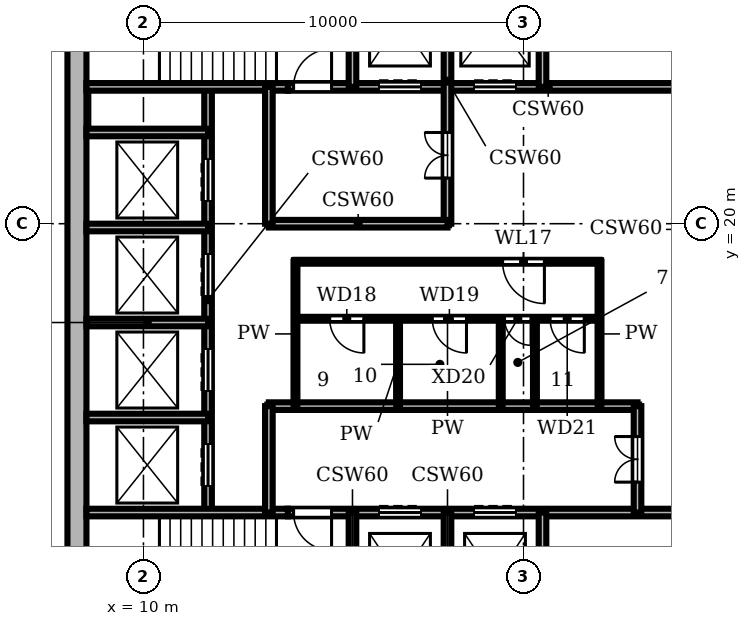
"""IFC4 building model, lengths in metres.
Left out: names, types, materials, properties, quantities, classifications, styles, units other than length and angle.
Written with IfcOpenShell. Run it as: python <this file> out.ifc"""

import sys

from ifc_helpers import new_model, si_unit, direction, frame, frame_2d, origin, place, context, subcontext, project, spatial, rectangle, extrude, element, fill, save


model = new_model("IFC4")
c1 = context("Model", 3, precision=1e-05, world=origin(), true_north=direction((0.0, 1.0)))
c2 = subcontext(c1, "Body", "Model", "MODEL_VIEW")
j1 = project(units=[si_unit("LENGTHUNIT", "METRE"), si_unit("PLANEANGLEUNIT", "RADIAN")], contexts=[c1])
p1 = place(None, origin())
s1 = spatial("IfcSite", under=j1, at=p1, CompositionType="ELEMENT")
p2 = place(p1, origin())
s2 = spatial("IfcBuilding", under=s1, at=p2, CompositionType="ELEMENT")
p3 = place(p2, frame((0.0, 0.0, 306.0)))
s3 = spatial("IfcBuildingStorey", under=s2, at=p3, CompositionType="ELEMENT", Elevation=306.0)
p4 = place(p3, frame((8.25, 27.5, 0.0), z_axis=(0.0, 0.0, 1.0), x_axis=(0.0, -1.0, 0.0)))
e1 = element("IfcWall", 1, at=p4, inside=s3, PredefinedType="SHEAR", context=c2, shape_type="SweptSolid", body=[
    extrude(rectangle(XDim=19.0, YDim=0.5, at=frame_2d((9.5, 0.0))), origin(), (0.0, 0.0, 1.0), 3.9),
])
p5 = place(p3, frame((8.5, 12.4, 0.0), z_axis=(0.0, 0.0, 1.0), x_axis=(1.0, 0.0, 0.0)))
e2 = element("IfcWall", 2, at=p5, inside=s3, PredefinedType="SHEAR", context=c2, shape_type="SweptSolid", body=[
    extrude(rectangle(XDim=5.3, YDim=0.2, at=frame_2d((2.65, 0.0))), origin(), (0.0, 0.0, 1.0), 3.58),
])
p6 = place(p3, frame((13.8, 12.4, 0.0), z_axis=(0.0, 0.0, 1.0), x_axis=(1.0, 0.0, 0.0)))
e3 = element("IfcWall", 3, at=p6, inside=s3, PredefinedType="SHEAR", context=c2, shape_type="SweptSolid", body=[
    extrude(rectangle(XDim=13.7, YDim=0.2, at=frame_2d((6.85, 0.0))), origin(), (0.0, 0.0, 1.0), 3.58),
])
p7 = place(p6, frame((2.4, 0.0, 0.0)))
e4 = element("IfcOpeningElement", 4, at=p7, cuts=e3, PredefinedType="OPENING", context=c2, shape_type="SweptSolid", body=[
    extrude(rectangle(XDim=1.1, YDim=2.1, at=frame_2d((0.55, 1.05))), frame((0.0, 0.11, 0.0), z_axis=(0.0, -1.0, 0.0), x_axis=(1.0, 0.0, 0.0)), (0.0, 0.0, 1.0), 0.22),
])
p8 = place(p6, frame((4.9, 0.0, 0.0)))
e5 = element("IfcOpeningElement", 5, at=p8, cuts=e3, PredefinedType="OPENING", context=c2, shape_type="SweptSolid", body=[
    extrude(rectangle(XDim=1.1, YDim=2.1, at=frame_2d((0.55, 1.05))), frame((0.0, 0.11, 0.0), z_axis=(0.0, -1.0, 0.0), x_axis=(1.0, 0.0, 0.0)), (0.0, 0.0, 1.0), 0.22),
])
p9 = place(p6, frame((0.15, 0.0, 0.0)))
e6 = element("IfcOpeningElement", 6, at=p9, cuts=e3, PredefinedType="OPENING", context=c2, shape_type="SweptSolid", body=[
    extrude(rectangle(XDim=1.0, YDim=2.1, at=frame_2d((0.5, 1.05))), frame((0.0, 0.11, 0.0), z_axis=(0.0, -1.0, 0.0), x_axis=(1.0, 0.0, 0.0)), (0.0, 0.0, 1.0), 0.22),
])
p10 = place(p3, frame((8.5, 14.9, 0.0), z_axis=(0.0, 0.0, 1.0), x_axis=(1.0, 0.0, 0.0)))
e7 = element("IfcWall", 7, at=p10, inside=s3, PredefinedType="SHEAR", context=c2, shape_type="SweptSolid", body=[
    extrude(rectangle(XDim=3.2, YDim=0.2, at=frame_2d((1.6, 0.0))), origin(), (0.0, 0.0, 1.0), 3.58),
])
p11 = place(p3, frame((13.3, 15.2, 0.0), z_axis=(0.0, 0.0, 1.0), x_axis=(1.0, 0.0, 0.0)))
e8 = element("IfcWall", 8, at=p11, inside=s3, PredefinedType="SHEAR", context=c2, shape_type="SweptSolid", body=[
    extrude(rectangle(XDim=9.7, YDim=0.2, at=frame_2d((4.85, 0.0))), origin(), (0.0, 0.0, 1.0), 3.58),
])
p12 = place(p3, frame((8.5, 17.4, 0.0), z_axis=(0.0, 0.0, 1.0), x_axis=(1.0, 0.0, 0.0)))
e9 = element("IfcWall", 9, at=p12, inside=s3, PredefinedType="SHEAR", context=c2, shape_type="SweptSolid", body=[
    extrude(rectangle(XDim=3.2, YDim=0.2, at=frame_2d((1.6, 0.0))), origin(), (0.0, 0.0, 1.0), 3.58),
])
p13 = place(p3, frame((14.0, 17.5, 0.0), z_axis=(0.0, 0.0, 1.0), x_axis=(1.0, 0.0, 0.0)))
e10 = element("IfcWall", 10, at=p13, inside=s3, PredefinedType="PARTITIONING", context=c2, shape_type="SweptSolid", body=[
    extrude(rectangle(XDim=8.0, YDim=0.1, at=frame_2d((4.0, 0.0))), origin(), (0.0, 0.0, 1.0), 3.58),
])
p14 = place(p13, frame((0.9, 0.0, 0.0)))
e11 = element("IfcOpeningElement", 11, at=p14, cuts=e10, PredefinedType="OPENING", context=c2, shape_type="SweptSolid", body=[
    extrude(rectangle(XDim=0.9, YDim=2.1, at=frame_2d((0.45, 1.05))), frame((0.0, 0.06, 0.0), z_axis=(0.0, -1.0, 0.0), x_axis=(1.0, 0.0, 0.0)), (0.0, 0.0, 1.0), 0.12),
])
p15 = place(p13, frame((3.6, 0.0, 0.0)))
e12 = element("IfcOpeningElement", 12, at=p15, cuts=e10, PredefinedType="OPENING", context=c2, shape_type="SweptSolid", body=[
    extrude(rectangle(XDim=0.9, YDim=2.1, at=frame_2d((0.45, 1.05))), frame((0.0, 0.06, 0.0), z_axis=(0.0, -1.0, 0.0), x_axis=(1.0, 0.0, 0.0)), (0.0, 0.0, 1.0), 0.12),
])
p16 = place(p13, frame((5.5, 0.0, 0.0)))
e13 = element("IfcOpeningElement", 13, at=p16, cuts=e10, PredefinedType="OPENING", context=c2, shape_type="SweptSolid", body=[
    extrude(rectangle(XDim=0.7, YDim=2.1, at=frame_2d((0.35, 1.05))), frame((0.0, 0.06, 0.0), z_axis=(0.0, -1.0, 0.0), x_axis=(1.0, 0.0, 0.0)), (0.0, 0.0, 1.0), 0.12),
])
p17 = place(p13, frame((6.7, 0.0, 0.0)))
e14 = element("IfcOpeningElement", 14, at=p17, cuts=e10, PredefinedType="OPENING", context=c2, shape_type="SweptSolid", body=[
    extrude(rectangle(XDim=0.9, YDim=2.1, at=frame_2d((0.45, 1.05))), frame((0.0, 0.06, 0.0), z_axis=(0.0, -1.0, 0.0), x_axis=(1.0, 0.0, 0.0)), (0.0, 0.0, 1.0), 0.12),
])
p18 = place(p3, frame((14.0, 19.0, 0.0), z_axis=(0.0, 0.0, 1.0), x_axis=(1.0, 0.0, 0.0)))
e15 = element("IfcWall", 15, at=p18, inside=s3, PredefinedType="PARTITIONING", context=c2, shape_type="SweptSolid", body=[
    extrude(rectangle(XDim=8.0, YDim=0.1, at=frame_2d((4.0, 0.0))), origin(), (0.0, 0.0, 1.0), 3.58),
])
p19 = place(p18, frame((5.45, 0.0, 0.0)))
e16 = element("IfcOpeningElement", 16, at=p19, cuts=e15, PredefinedType="OPENING", context=c2, shape_type="SweptSolid", body=[
    extrude(rectangle(XDim=1.1, YDim=2.1, at=frame_2d((0.55, 1.05))), frame((0.0, 0.06, 0.0), z_axis=(0.0, -1.0, 0.0), x_axis=(1.0, 0.0, 0.0)), (0.0, 0.0, 1.0), 0.12),
])
p20 = place(p3, frame((8.5, 19.9, 0.0), z_axis=(0.0, 0.0, 1.0), x_axis=(1.0, 0.0, 0.0)))
e17 = element("IfcWall", 17, at=p20, inside=s3, PredefinedType="SHEAR", context=c2, shape_type="SweptSolid", body=[
    extrude(rectangle(XDim=3.2, YDim=0.2, at=frame_2d((1.6, 0.0))), origin(), (0.0, 0.0, 1.0), 3.58),
])
p21 = place(p3, frame((13.3, 20.0, 0.0), z_axis=(0.0, 0.0, 1.0), x_axis=(1.0, 0.0, 0.0)))
e18 = element("IfcWall", 18, at=p21, inside=s3, PredefinedType="SHEAR", context=c2, shape_type="SweptSolid", body=[
    extrude(rectangle(XDim=4.7, YDim=0.2, at=frame_2d((2.35, 0.0))), origin(), (0.0, 0.0, 1.0), 3.58),
])
p22 = place(p3, frame((8.5, 22.4, 0.0), z_axis=(0.0, 0.0, 1.0), x_axis=(1.0, 0.0, 0.0)))
e19 = element("IfcWall", 19, at=p22, inside=s3, PredefinedType="SHEAR", context=c2, shape_type="SweptSolid", body=[
    extrude(rectangle(XDim=3.2, YDim=0.2, at=frame_2d((1.6, 0.0))), origin(), (0.0, 0.0, 1.0), 3.58),
])
p23 = place(p3, frame((8.5, 23.6, 0.0), z_axis=(0.0, 0.0, 1.0), x_axis=(1.0, 0.0, 0.0)))
e20 = element("IfcWall", 20, at=p23, inside=s3, PredefinedType="SHEAR", context=c2, shape_type="SweptSolid", body=[
    extrude(rectangle(XDim=5.3, YDim=0.2, at=frame_2d((2.65, 0.0))), origin(), (0.0, 0.0, 1.0), 3.58),
])
p24 = place(p3, frame((13.8, 23.6, 0.0), z_axis=(0.0, 0.0, 1.0), x_axis=(1.0, 0.0, 0.0)))
e21 = element("IfcWall", 21, at=p24, inside=s3, PredefinedType="SHEAR", context=c2, shape_type="SweptSolid", body=[
    extrude(rectangle(XDim=13.7, YDim=0.2, at=frame_2d((6.85, 0.0))), origin(), (0.0, 0.0, 1.0), 3.58),
])
p25 = place(p24, frame((2.4, 0.0, 0.0)))
e22 = element("IfcOpeningElement", 22, at=p25, cuts=e21, PredefinedType="OPENING", context=c2, shape_type="SweptSolid", body=[
    extrude(rectangle(XDim=1.1, YDim=2.1, at=frame_2d((0.55, 1.05))), frame((0.0, 0.11, 0.0), z_axis=(0.0, -1.0, 0.0), x_axis=(1.0, 0.0, 0.0)), (0.0, 0.0, 1.0), 0.22),
])
p26 = place(p24, frame((4.9, 0.0, 0.0)))
e23 = element("IfcOpeningElement", 23, at=p26, cuts=e21, PredefinedType="OPENING", context=c2, shape_type="SweptSolid", body=[
    extrude(rectangle(XDim=1.1, YDim=2.1, at=frame_2d((0.55, 1.05))), frame((0.0, 0.11, 0.0), z_axis=(0.0, -1.0, 0.0), x_axis=(1.0, 0.0, 0.0)), (0.0, 0.0, 1.0), 0.22),
])
p27 = place(p24, frame((0.15, 0.0, 0.0)))
e24 = element("IfcOpeningElement", 24, at=p27, cuts=e21, PredefinedType="OPENING", context=c2, shape_type="SweptSolid", body=[
    extrude(rectangle(XDim=1.0, YDim=2.1, at=frame_2d((0.5, 1.05))), frame((0.0, 0.11, 0.0), z_axis=(0.0, -1.0, 0.0), x_axis=(1.0, 0.0, 0.0)), (0.0, 0.0, 1.0), 0.22),
])
p28 = place(p3, frame((11.7, 12.4, 0.0), z_axis=(0.0, 0.0, 1.0), x_axis=(0.0, 1.0, 0.0)))
e25 = element("IfcWall", 25, at=p28, inside=s3, PredefinedType="SHEAR", context=c2, shape_type="SweptSolid", body=[
    extrude(rectangle(XDim=11.2, YDim=0.2, at=frame_2d((5.6, 0.0))), origin(), (0.0, 0.0, 1.0), 3.58),
])
p29 = place(p28, frame((0.7, 0.0, 0.0)))
e26 = element("IfcOpeningElement", 26, at=p29, cuts=e25, PredefinedType="OPENING", context=c2, shape_type="SweptSolid", body=[
    extrude(rectangle(XDim=1.1, YDim=2.1, at=frame_2d((0.55, 1.05))), frame((0.0, 0.11, 0.0), z_axis=(0.0, -1.0, 0.0), x_axis=(1.0, 0.0, 0.0)), (0.0, 0.0, 1.0), 0.22),
])
p30 = place(p28, frame((3.2, 0.0, 0.0)))
e27 = element("IfcOpeningElement", 27, at=p30, cuts=e25, PredefinedType="OPENING", context=c2, shape_type="SweptSolid", body=[
    extrude(rectangle(XDim=1.1, YDim=2.1, at=frame_2d((0.55, 1.05))), frame((0.0, 0.11, 0.0), z_axis=(0.0, -1.0, 0.0), x_axis=(1.0, 0.0, 0.0)), (0.0, 0.0, 1.0), 0.22),
])
p31 = place(p28, frame((5.7, 0.0, 0.0)))
e28 = element("IfcOpeningElement", 28, at=p31, cuts=e25, PredefinedType="OPENING", context=c2, shape_type="SweptSolid", body=[
    extrude(rectangle(XDim=1.1, YDim=2.1, at=frame_2d((0.55, 1.05))), frame((0.0, 0.11, 0.0), z_axis=(0.0, -1.0, 0.0), x_axis=(1.0, 0.0, 0.0)), (0.0, 0.0, 1.0), 0.22),
])
p32 = place(p28, frame((8.2, 0.0, 0.0)))
e29 = element("IfcOpeningElement", 29, at=p32, cuts=e25, PredefinedType="OPENING", context=c2, shape_type="SweptSolid", body=[
    extrude(rectangle(XDim=1.1, YDim=2.1, at=frame_2d((0.55, 1.05))), frame((0.0, 0.11, 0.0), z_axis=(0.0, -1.0, 0.0), x_axis=(1.0, 0.0, 0.0)), (0.0, 0.0, 1.0), 0.22),
])
p33 = place(p3, frame((13.3, 12.4, 0.0), z_axis=(0.0, 0.0, 1.0), x_axis=(0.0, 1.0, 0.0)))
e30 = element("IfcWall", 30, at=p33, inside=s3, PredefinedType="SHEAR", context=c2, shape_type="SweptSolid", body=[
    extrude(rectangle(XDim=2.8, YDim=0.2, at=frame_2d((1.4, 0.0))), origin(), (0.0, 0.0, 1.0), 3.58),
])
p34 = place(p3, frame((13.3, 20.0, 0.0), z_axis=(0.0, 0.0, 1.0), x_axis=(0.0, 1.0, 0.0)))
e31 = element("IfcWall", 31, at=p34, inside=s3, PredefinedType="SHEAR", context=c2, shape_type="SweptSolid", body=[
    extrude(rectangle(XDim=3.6, YDim=0.2, at=frame_2d((1.8, 0.0))), origin(), (0.0, 0.0, 1.0), 3.58),
])
p35 = place(p3, frame((14.0, 15.2, 0.0), z_axis=(0.0, 0.0, 1.0), x_axis=(0.0, 1.0, 0.0)))
e32 = element("IfcWall", 32, at=p35, inside=s3, PredefinedType="PARTITIONING", context=c2, shape_type="SweptSolid", body=[
    extrude(rectangle(XDim=3.8, YDim=0.1, at=frame_2d((1.9, 0.0))), origin(), (0.0, 0.0, 1.0), 3.58),
])
for number, where, z_axis, x_axis in (
    (33, (15.5, 8.5, 0.0), (0.0, 0.0, 1.0), (0.0, 1.0, 0.0)),
    (34, (15.5, 23.6, 0.0), (0.0, 0.0, 1.0), (0.0, 1.0, 0.0)),
):
    element("IfcWall", number, at=place(p3, frame(where, z_axis=z_axis, x_axis=x_axis)), inside=s3, PredefinedType="SHEAR", context=c2, shape_type="SweptSolid", body=[
        extrude(rectangle(XDim=3.9, YDim=0.2, at=frame_2d((1.95, 0.0))), origin(), (0.0, 0.0, 1.0), 3.58),
    ])
p36 = place(p3, frame((16.7, 15.2, 0.0), z_axis=(0.0, 0.0, 1.0), x_axis=(0.0, 1.0, 0.0)))
e35 = element("IfcWall", 35, at=p36, inside=s3, PredefinedType="PARTITIONING", context=c2, shape_type="SweptSolid", body=[
    extrude(rectangle(XDim=2.3, YDim=0.1, at=frame_2d((1.15, 0.0))), origin(), (0.0, 0.0, 1.0), 3.58),
])
p37 = place(p3, frame((18.0, 8.5, 0.0), z_axis=(0.0, 0.0, 1.0), x_axis=(0.0, 1.0, 0.0)))
e36 = element("IfcWall", 36, at=p37, inside=s3, PredefinedType="SHEAR", context=c2, shape_type="SweptSolid", body=[
    extrude(rectangle(XDim=3.9, YDim=0.2, at=frame_2d((1.95, 0.0))), origin(), (0.0, 0.0, 1.0), 3.58),
])
p38 = place(p3, frame((18.0, 20.0, 0.0), z_axis=(0.0, 0.0, 1.0), x_axis=(0.0, 1.0, 0.0)))
e37 = element("IfcWall", 37, at=p38, inside=s3, PredefinedType="SHEAR", context=c2, shape_type="SweptSolid", body=[
    extrude(rectangle(XDim=7.5, YDim=0.2, at=frame_2d((3.75, 0.0))), origin(), (0.0, 0.0, 1.0), 3.58),
])
p39 = place(p38, frame((1.2, 0.0, 0.0)))
e38 = element("IfcOpeningElement", 38, at=p39, cuts=e37, PredefinedType="OPENING", context=c2, shape_type="SweptSolid", body=[
    extrude(rectangle(XDim=1.2, YDim=2.1, at=frame_2d((0.6, 1.05))), frame((0.0, 0.11, 0.0), z_axis=(0.0, -1.0, 0.0), x_axis=(1.0, 0.0, 0.0)), (0.0, 0.0, 1.0), 0.22),
])
for number, where, z_axis, x_axis in (
    (39, (19.4, 15.2, 0.0), (0.0, 0.0, 1.0), (0.0, 1.0, 0.0)),
    (40, (20.3, 15.2, 0.0), (0.0, 0.0, 1.0), (0.0, 1.0, 0.0)),
):
    element("IfcWall", number, at=place(p3, frame(where, z_axis=z_axis, x_axis=x_axis)), inside=s3, PredefinedType="PARTITIONING", context=c2, shape_type="SweptSolid", body=[
        extrude(rectangle(XDim=2.3, YDim=0.1, at=frame_2d((1.15, 0.0))), origin(), (0.0, 0.0, 1.0), 3.58),
    ])
for number, where, z_axis, x_axis in (
    (41, (20.5, 8.5, 0.0), (0.0, 0.0, 1.0), (0.0, 1.0, 0.0)),
    (42, (20.5, 23.6, 0.0), (0.0, 0.0, 1.0), (0.0, 1.0, 0.0)),
):
    element("IfcWall", number, at=place(p3, frame(where, z_axis=z_axis, x_axis=x_axis)), inside=s3, PredefinedType="SHEAR", context=c2, shape_type="SweptSolid", body=[
        extrude(rectangle(XDim=3.9, YDim=0.2, at=frame_2d((1.95, 0.0))), origin(), (0.0, 0.0, 1.0), 3.58),
    ])
p40 = place(p3, frame((22.0, 15.2, 0.0), z_axis=(0.0, 0.0, 1.0), x_axis=(0.0, 1.0, 0.0)))
e43 = element("IfcWall", 43, at=p40, inside=s3, PredefinedType="PARTITIONING", context=c2, shape_type="SweptSolid", body=[
    extrude(rectangle(XDim=3.8, YDim=0.1, at=frame_2d((1.9, 0.0))), origin(), (0.0, 0.0, 1.0), 3.58),
])
p41 = place(p3, frame((23.0, 12.4, 0.0), z_axis=(0.0, 0.0, 1.0), x_axis=(0.0, 1.0, 0.0)))
e44 = element("IfcWall", 44, at=p41, inside=s3, PredefinedType="SHEAR", context=c2, shape_type="SweptSolid", body=[
    extrude(rectangle(XDim=2.8, YDim=0.2, at=frame_2d((1.4, 0.0))), origin(), (0.0, 0.0, 1.0), 3.58),
])
p42 = place(p41, frame((0.8, 0.0, 0.0)))
e45 = element("IfcOpeningElement", 45, at=p42, cuts=e44, PredefinedType="OPENING", context=c2, shape_type="SweptSolid", body=[
    extrude(rectangle(XDim=1.2, YDim=2.1, at=frame_2d((0.6, 1.05))), frame((0.0, 0.11, 0.0), z_axis=(0.0, -1.0, 0.0), x_axis=(1.0, 0.0, 0.0)), (0.0, 0.0, 1.0), 0.22),
])
p43 = place(p29, origin())
e46 = element("IfcDoor", 46, at=p43, inside=s3, OperationType="DOUBLE_DOOR_SLIDING", PredefinedType="DOOR", context=c2, shape_type="SweptSolid", body=[
    extrude(rectangle(XDim=1.1, YDim=2.1, at=frame_2d((0.55, 1.05))), frame((0.0, 0.025, 0.0), z_axis=(0.0, -1.0, 0.0), x_axis=(1.0, 0.0, 0.0)), (0.0, 0.0, 1.0), 0.05),
])
fill(e26, e46)
p44 = place(p30, origin())
e47 = element("IfcDoor", 47, at=p44, inside=s3, OperationType="DOUBLE_DOOR_SLIDING", PredefinedType="DOOR", context=c2, shape_type="SweptSolid", body=[
    extrude(rectangle(XDim=1.1, YDim=2.1, at=frame_2d((0.55, 1.05))), frame((0.0, 0.025, 0.0), z_axis=(0.0, -1.0, 0.0), x_axis=(1.0, 0.0, 0.0)), (0.0, 0.0, 1.0), 0.05),
])
fill(e27, e47)
p45 = place(p31, origin())
e48 = element("IfcDoor", 48, at=p45, inside=s3, OperationType="DOUBLE_DOOR_SLIDING", PredefinedType="DOOR", context=c2, shape_type="SweptSolid", body=[
    extrude(rectangle(XDim=1.1, YDim=2.1, at=frame_2d((0.55, 1.05))), frame((0.0, 0.025, 0.0), z_axis=(0.0, -1.0, 0.0), x_axis=(1.0, 0.0, 0.0)), (0.0, 0.0, 1.0), 0.05),
])
fill(e28, e48)
p46 = place(p32, origin())
e49 = element("IfcDoor", 49, at=p46, inside=s3, OperationType="DOUBLE_DOOR_SLIDING", PredefinedType="DOOR", context=c2, shape_type="SweptSolid", body=[
    extrude(rectangle(XDim=1.1, YDim=2.1, at=frame_2d((0.55, 1.05))), frame((0.0, 0.025, 0.0), z_axis=(0.0, -1.0, 0.0), x_axis=(1.0, 0.0, 0.0)), (0.0, 0.0, 1.0), 0.05),
])
fill(e29, e49)
p47 = place(p7, origin())
e50 = element("IfcDoor", 50, at=p47, inside=s3, OperationType="DOUBLE_DOOR_SLIDING", PredefinedType="DOOR", context=c2, shape_type="SweptSolid", body=[
    extrude(rectangle(XDim=1.1, YDim=2.1, at=frame_2d((0.55, 1.05))), frame((0.0, 0.025, 0.0), z_axis=(0.0, -1.0, 0.0), x_axis=(1.0, 0.0, 0.0)), (0.0, 0.0, 1.0), 0.05),
])
fill(e4, e50)
p48 = place(p8, origin())
e51 = element("IfcDoor", 51, at=p48, inside=s3, OperationType="DOUBLE_DOOR_SLIDING", PredefinedType="DOOR", context=c2, shape_type="SweptSolid", body=[
    extrude(rectangle(XDim=1.1, YDim=2.1, at=frame_2d((0.55, 1.05))), frame((0.0, 0.025, 0.0), z_axis=(0.0, -1.0, 0.0), x_axis=(1.0, 0.0, 0.0)), (0.0, 0.0, 1.0), 0.05),
])
fill(e5, e51)
p49 = place(p25, origin())
e52 = element("IfcDoor", 52, at=p49, inside=s3, OperationType="DOUBLE_DOOR_SLIDING", PredefinedType="DOOR", context=c2, shape_type="SweptSolid", body=[
    extrude(rectangle(XDim=1.1, YDim=2.1, at=frame_2d((0.55, 1.05))), frame((0.0, 0.025, 0.0), z_axis=(0.0, -1.0, 0.0), x_axis=(1.0, 0.0, 0.0)), (0.0, 0.0, 1.0), 0.05),
])
fill(e22, e52)
p50 = place(p26, origin())
e53 = element("IfcDoor", 53, at=p50, inside=s3, OperationType="DOUBLE_DOOR_SLIDING", PredefinedType="DOOR", context=c2, shape_type="SweptSolid", body=[
    extrude(rectangle(XDim=1.1, YDim=2.1, at=frame_2d((0.55, 1.05))), frame((0.0, 0.025, 0.0), z_axis=(0.0, -1.0, 0.0), x_axis=(1.0, 0.0, 0.0)), (0.0, 0.0, 1.0), 0.05),
])
fill(e23, e53)
p51 = place(p9, frame((1.0, 0.0, 0.0), z_axis=(0.0, 0.0, 1.0), x_axis=(-1.0, 0.0, 0.0)))
e54 = element("IfcDoor", 54, at=p51, inside=s3, OperationType="SINGLE_SWING_LEFT", PredefinedType="DOOR", context=c2, shape_type="SweptSolid", body=[
    extrude(rectangle(XDim=1.0, YDim=2.1, at=frame_2d((0.5, 1.05))), frame((0.0, 0.025, 0.0), z_axis=(0.0, -1.0, 0.0), x_axis=(1.0, 0.0, 0.0)), (0.0, 0.0, 1.0), 0.05),
])
fill(e6, e54)
p52 = place(p27, origin())
e55 = element("IfcDoor", 55, at=p52, inside=s3, OperationType="SINGLE_SWING_RIGHT", PredefinedType="DOOR", context=c2, shape_type="SweptSolid", body=[
    extrude(rectangle(XDim=1.0, YDim=2.1, at=frame_2d((0.5, 1.05))), frame((0.0, 0.025, 0.0), z_axis=(0.0, -1.0, 0.0), x_axis=(1.0, 0.0, 0.0)), (0.0, 0.0, 1.0), 0.05),
])
fill(e24, e55)
p53 = place(p42, origin())
e56 = element("IfcDoor", 56, at=p53, inside=s3, OperationType="DOUBLE_DOOR_SINGLE_SWING", PredefinedType="DOOR", context=c2, shape_type="SweptSolid", body=[
    extrude(rectangle(XDim=1.2, YDim=2.1, at=frame_2d((0.6, 1.05))), frame((0.0, 0.025, 0.0), z_axis=(0.0, -1.0, 0.0), x_axis=(1.0, 0.0, 0.0)), (0.0, 0.0, 1.0), 0.05),
])
fill(e45, e56)
p54 = place(p39, origin())
e57 = element("IfcDoor", 57, at=p54, inside=s3, OperationType="DOUBLE_DOOR_SINGLE_SWING", PredefinedType="DOOR", context=c2, shape_type="SweptSolid", body=[
    extrude(rectangle(XDim=1.2, YDim=2.1, at=frame_2d((0.6, 1.05))), frame((0.0, 0.025, 0.0), z_axis=(0.0, -1.0, 0.0), x_axis=(1.0, 0.0, 0.0)), (0.0, 0.0, 1.0), 0.05),
])
fill(e38, e57)
p55 = place(p19, frame((1.1, 0.0, 0.0), z_axis=(0.0, 0.0, 1.0), x_axis=(-1.0, 0.0, 0.0)))
e58 = element("IfcDoor", 58, at=p55, inside=s3, OperationType="SINGLE_SWING_LEFT", PredefinedType="DOOR", context=c2, shape_type="SweptSolid", body=[
    extrude(rectangle(XDim=1.1, YDim=2.1, at=frame_2d((0.55, 1.05))), frame((0.0, 0.025, 0.0), z_axis=(0.0, -1.0, 0.0), x_axis=(1.0, 0.0, 0.0)), (0.0, 0.0, 1.0), 0.05),
])
fill(e16, e58)
p56 = place(p14, frame((0.9, 0.0, 0.0), z_axis=(0.0, 0.0, 1.0), x_axis=(-1.0, 0.0, 0.0)))
e59 = element("IfcDoor", 59, at=p56, inside=s3, OperationType="SINGLE_SWING_LEFT", PredefinedType="DOOR", context=c2, shape_type="SweptSolid", body=[
    extrude(rectangle(XDim=0.9, YDim=2.1, at=frame_2d((0.45, 1.05))), frame((0.0, 0.025, 0.0), z_axis=(0.0, -1.0, 0.0), x_axis=(1.0, 0.0, 0.0)), (0.0, 0.0, 1.0), 0.05),
])
fill(e11, e59)
p57 = place(p15, frame((0.9, 0.0, 0.0), z_axis=(0.0, 0.0, 1.0), x_axis=(-1.0, 0.0, 0.0)))
e60 = element("IfcDoor", 60, at=p57, inside=s3, OperationType="SINGLE_SWING_LEFT", PredefinedType="DOOR", context=c2, shape_type="SweptSolid", body=[
    extrude(rectangle(XDim=0.9, YDim=2.1, at=frame_2d((0.45, 1.05))), frame((0.0, 0.025, 0.0), z_axis=(0.0, -1.0, 0.0), x_axis=(1.0, 0.0, 0.0)), (0.0, 0.0, 1.0), 0.05),
])
fill(e12, e60)
p58 = place(p16, frame((0.7, 0.0, 0.0), z_axis=(0.0, 0.0, 1.0), x_axis=(-1.0, 0.0, 0.0)))
e61 = element("IfcDoor", 61, at=p58, inside=s3, OperationType="SINGLE_SWING_LEFT", PredefinedType="DOOR", context=c2, shape_type="SweptSolid", body=[
    extrude(rectangle(XDim=0.7, YDim=2.1, at=frame_2d((0.35, 1.05))), frame((0.0, 0.025, 0.0), z_axis=(0.0, -1.0, 0.0), x_axis=(1.0, 0.0, 0.0)), (0.0, 0.0, 1.0), 0.05),
])
fill(e13, e61)
p59 = place(p17, frame((0.9, 0.0, 0.0), z_axis=(0.0, 0.0, 1.0), x_axis=(-1.0, 0.0, 0.0)))
e62 = element("IfcDoor", 62, at=p59, inside=s3, OperationType="SINGLE_SWING_LEFT", PredefinedType="DOOR", context=c2, shape_type="SweptSolid", body=[
    extrude(rectangle(XDim=0.9, YDim=2.1, at=frame_2d((0.45, 1.05))), frame((0.0, 0.025, 0.0), z_axis=(0.0, -1.0, 0.0), x_axis=(1.0, 0.0, 0.0)), (0.0, 0.0, 1.0), 0.05),
])
fill(e14, e62)
save(model, sys.argv[1])
